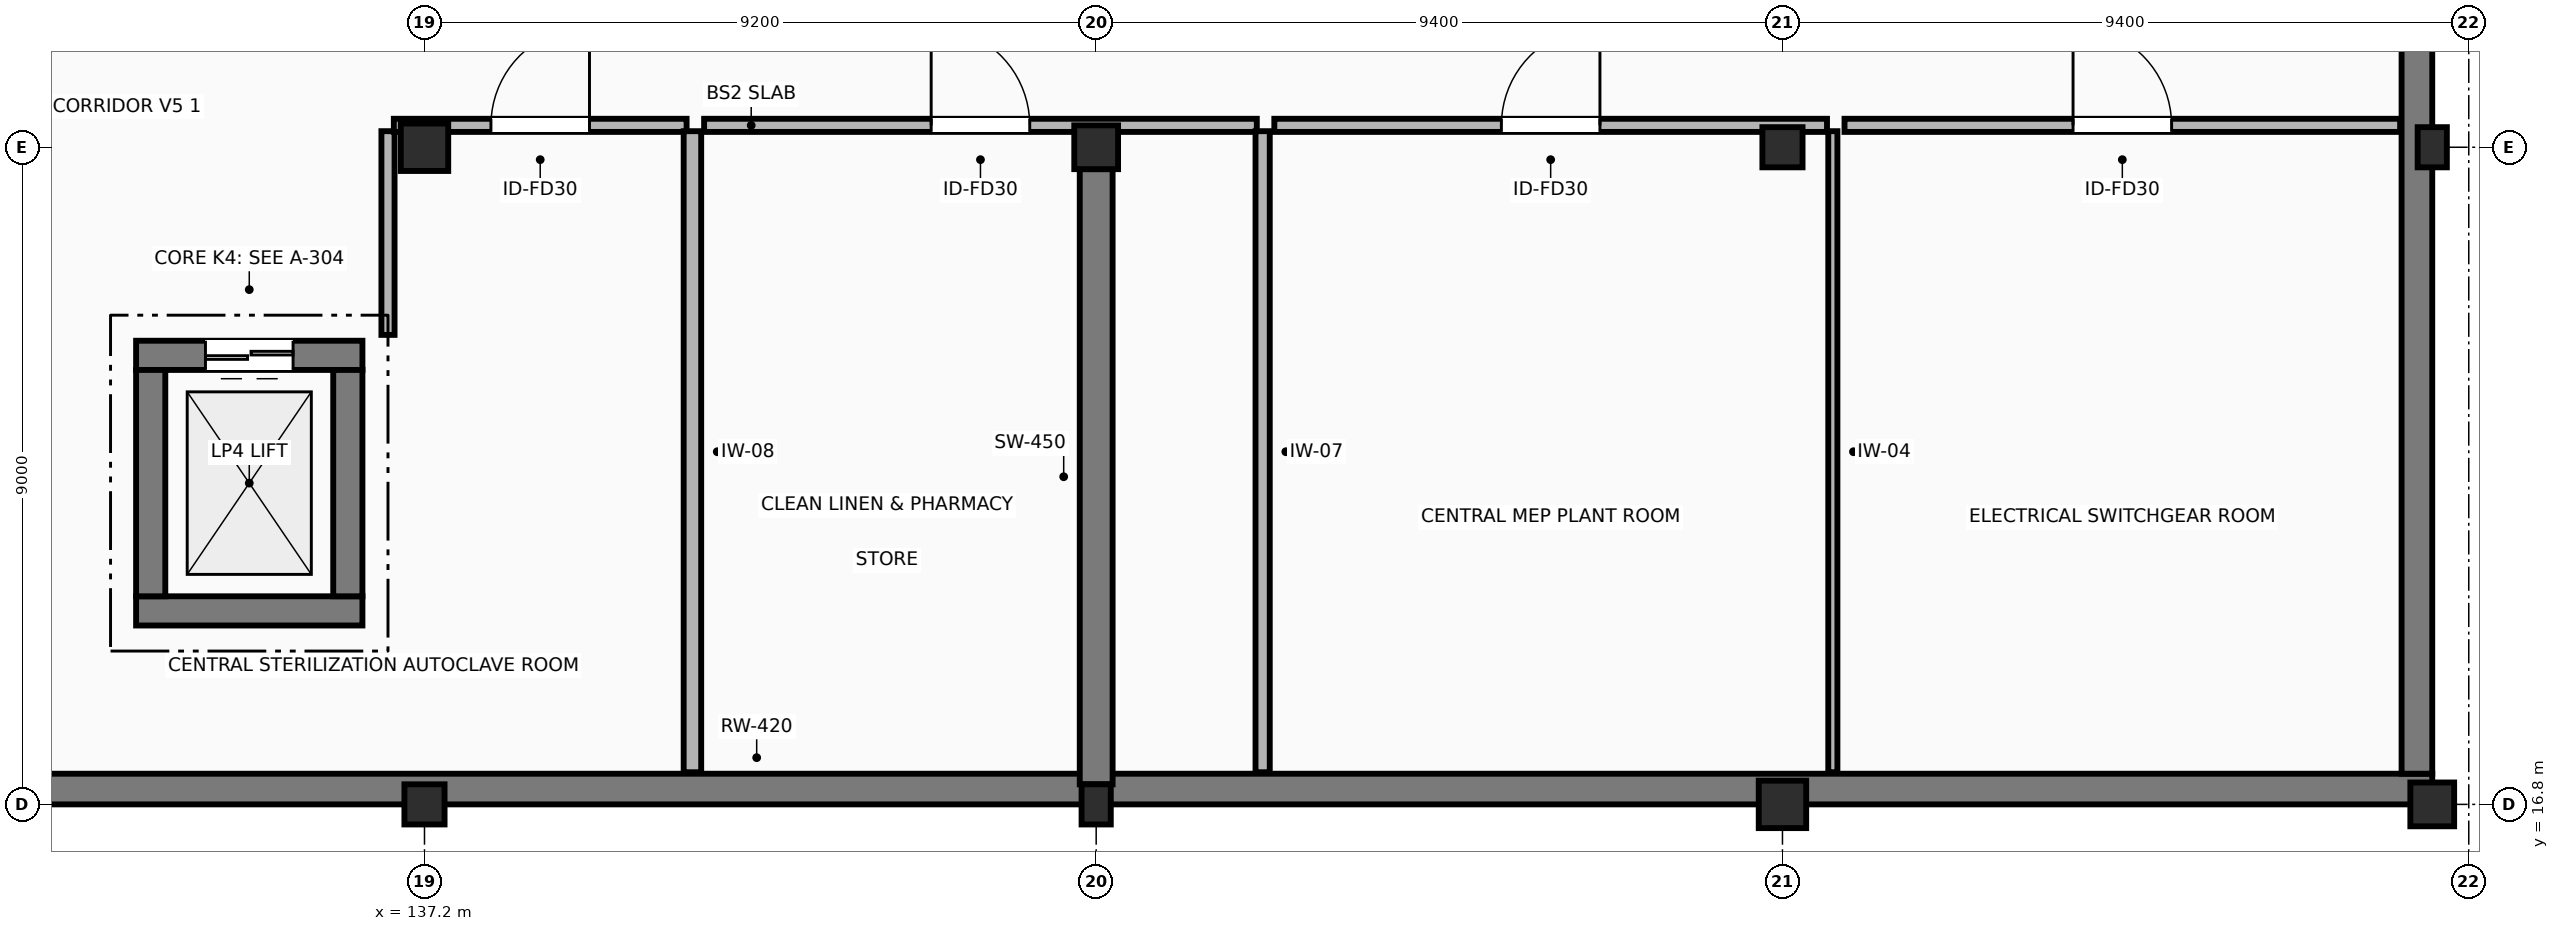
"""IFC4 building model, lengths in metres.
Left out: names, types, materials, properties, quantities, classifications, styles, units other than length and angle.
Written with IfcOpenShell. Run it as: python <this file> out.ifc"""

import sys

from ifc_helpers import new_model, si_unit, direction, frame, frame_2d, origin, origin_2d, place, context, subcontext, project, spatial, rectangle, extrude, element, fill, save


model = new_model("IFC4")
c1 = context("Model", 3, precision=1e-05, world=origin(), true_north=direction((0.0, 1.0)))
c2 = subcontext(c1, "Body", "Model", "MODEL_VIEW")
j1 = project(units=[si_unit("LENGTHUNIT", "METRE"), si_unit("PLANEANGLEUNIT", "RADIAN")], contexts=[c1])
p1 = place(None, origin())
s1 = spatial("IfcSite", under=j1, at=p1, CompositionType="ELEMENT")
p2 = place(p1, origin())
s2 = spatial("IfcBuilding", under=s1, at=p2, CompositionType="ELEMENT")
p3 = place(p2, frame((0.0, 0.0, -4.5)))
s3 = spatial("IfcBuildingStorey", under=s2, at=p3, CompositionType="ELEMENT", Elevation=-4.5)
p4 = place(p3, frame((137.2, 16.8, -0.55), z_axis=(0.0, 0.0, 1.0), x_axis=(1.0, 0.0, 0.0)))
e1 = element("IfcColumn", 1, at=p4, inside=s3, PredefinedType="COLUMN", context=c2, shape_type="SweptSolid", body=[
    extrude(rectangle(XDim=0.55, YDim=0.55, at=origin_2d()), origin(), (0.0, 0.0, 1.0), 5.05),
])
p5 = place(p3, frame((137.2, 25.8, -0.55), z_axis=(0.0, 0.0, 1.0), x_axis=(1.0, 0.0, 0.0)))
e2 = element("IfcColumn", 2, at=p5, inside=s3, PredefinedType="COLUMN", context=c2, shape_type="SweptSolid", body=[
    extrude(rectangle(XDim=0.65, YDim=0.65, at=origin_2d()), origin(), (0.0, 0.0, 1.0), 5.05),
])
p6 = place(p3, frame((146.4, 16.8, -0.55), z_axis=(0.0, 0.0, 1.0), x_axis=(1.0, 0.0, 0.0)))
e3 = element("IfcColumn", 3, at=p6, inside=s3, PredefinedType="COLUMN", context=c2, shape_type="SweptSolid", body=[
    extrude(rectangle(XDim=0.4, YDim=0.55, at=origin_2d()), origin(), (0.0, 0.0, 1.0), 5.05),
])
p7 = place(p3, frame((146.4, 25.8, -0.55), z_axis=(0.0, 0.0, 1.0), x_axis=(1.0, 0.0, 0.0)))
e4 = element("IfcColumn", 4, at=p7, inside=s3, PredefinedType="COLUMN", context=c2, shape_type="SweptSolid", body=[
    extrude(rectangle(XDim=0.6, YDim=0.6, at=origin_2d()), origin(), (0.0, 0.0, 1.0), 5.05),
])
p8 = place(p3, frame((155.8, 16.8, -0.55), z_axis=(0.0, 0.0, 1.0), x_axis=(1.0, 0.0, 0.0)))
e5 = element("IfcColumn", 5, at=p8, inside=s3, PredefinedType="COLUMN", context=c2, shape_type="SweptSolid", body=[
    extrude(rectangle(XDim=0.65, YDim=0.65, at=origin_2d()), origin(), (0.0, 0.0, 1.0), 5.05),
])
p9 = place(p3, frame((155.8, 25.8, -0.55), z_axis=(0.0, 0.0, 1.0), x_axis=(1.0, 0.0, 0.0)))
e6 = element("IfcColumn", 6, at=p9, inside=s3, PredefinedType="COLUMN", context=c2, shape_type="SweptSolid", body=[
    extrude(rectangle(XDim=0.55, YDim=0.55, at=origin_2d()), origin(), (0.0, 0.0, 1.0), 5.05),
])
p10 = place(p3, frame((164.7, 16.8, -0.55), z_axis=(0.0, 0.0, 1.0), x_axis=(1.0, 0.0, 0.0)))
e7 = element("IfcColumn", 7, at=p10, inside=s3, PredefinedType="COLUMN", context=c2, shape_type="SweptSolid", body=[
    extrude(rectangle(XDim=0.6, YDim=0.6, at=origin_2d()), origin(), (0.0, 0.0, 1.0), 5.05),
])
p11 = place(p3, frame((164.7, 25.8, -0.55), z_axis=(0.0, 0.0, 1.0), x_axis=(1.0, 0.0, 0.0)))
e8 = element("IfcColumn", 8, at=p11, inside=s3, PredefinedType="COLUMN", context=c2, shape_type="SweptSolid", body=[
    extrude(rectangle(XDim=0.4, YDim=0.55, at=origin_2d()), origin(), (0.0, 0.0, 1.0), 5.05),
])
p12 = place(p3, frame((118.8, 17.01, 0.0), z_axis=(0.0, 0.0, 1.0), x_axis=(1.0, 0.0, 0.0)))
e9 = element("IfcWall", 9, at=p12, inside=s3, PredefinedType="SHEAR", context=c2, shape_type="SweptSolid", body=[
    extrude(rectangle(XDim=45.9, YDim=0.42, at=frame_2d((22.95, 0.0))), origin(), (0.0, 0.0, 1.0), 4.2),
])
p13 = place(p3, frame((164.49, 43.98, 0.0), z_axis=(0.0, 0.0, 1.0), x_axis=(0.0, -1.0, 0.0)))
e10 = element("IfcWall", 10, at=p13, inside=s3, PredefinedType="SHEAR", context=c2, shape_type="SweptSolid", body=[
    extrude(rectangle(XDim=26.76, YDim=0.42, at=frame_2d((13.38, 0.0))), origin(), (0.0, 0.0, 1.0), 4.2),
])
p14 = place(p3, frame((133.25, 19.45, -0.55), z_axis=(0.0, 0.0, 1.0), x_axis=(1.0, 0.0, 0.0)))
e11 = element("IfcWall", 11, at=p14, inside=s3, PredefinedType="SHEAR", context=c2, shape_type="SweptSolid", body=[
    extrude(rectangle(XDim=3.1, YDim=0.4, at=frame_2d((1.55, 0.0))), origin(), (0.0, 0.0, 1.0), 5.05),
])
p15 = place(p3, frame((136.35, 22.95, -0.55), z_axis=(0.0, 0.0, 1.0), x_axis=(-1.0, 0.0, 0.0)))
e12 = element("IfcWall", 12, at=p15, inside=s3, PredefinedType="SHEAR", context=c2, shape_type="SweptSolid", body=[
    extrude(rectangle(XDim=3.1, YDim=0.4, at=frame_2d((1.55, 0.0))), origin(), (0.0, 0.0, 1.0), 5.05),
])
p16 = place(p15, frame((0.95, 0.0, 0.55)))
e13 = element("IfcOpeningElement", 13, at=p16, cuts=e12, PredefinedType="OPENING", context=c2, shape_type="SweptSolid", body=[
    extrude(rectangle(XDim=1.2, YDim=2.2, at=frame_2d((0.6, 1.1))), frame((0.0, 0.21, 0.0), z_axis=(0.0, -1.0, 0.0), x_axis=(1.0, 0.0, 0.0)), (0.0, 0.0, 1.0), 0.42),
])
for number, where, z_axis, x_axis in (
    (14, (133.45, 19.65, -0.55), (0.0, 0.0, 1.0), (0.0, 1.0, 0.0)),
    (15, (136.15, 22.75, -0.55), (0.0, 0.0, 1.0), (0.0, -1.0, 0.0)),
):
    element("IfcWall", number, at=place(p3, frame(where, z_axis=z_axis, x_axis=x_axis)), inside=s3, PredefinedType="SHEAR", context=c2, shape_type="SweptSolid", body=[
        extrude(rectangle(XDim=3.1, YDim=0.4, at=frame_2d((1.55, 0.0))), origin(), (0.0, 0.0, 1.0), 5.05),
    ])
p17 = place(p3, frame((146.4, 17.075, -0.55), z_axis=(0.0, 0.0, 1.0), x_axis=(0.0, 1.0, 0.0)))
e16 = element("IfcWall", 16, at=p17, inside=s3, PredefinedType="SHEAR", context=c2, shape_type="SweptSolid", body=[
    extrude(rectangle(XDim=8.425, YDim=0.45, at=frame_2d((4.212, 0.0))), origin(), (0.0, 0.0, 1.0), 4.75),
])
p18 = place(p3, frame((136.7, 23.23, 0.0), z_axis=(0.0, 0.0, 1.0), x_axis=(0.0, 1.0, 0.0)))
e17 = element("IfcWall", 17, at=p18, inside=s3, PredefinedType="PARTITIONING", context=c2, shape_type="SweptSolid", body=[
    extrude(rectangle(XDim=2.79, YDim=0.18, at=frame_2d((1.395, 0.0))), origin(), (0.0, 0.0, 1.0), 3.685),
])
p19 = place(p3, frame((136.78, 26.1, 0.0), z_axis=(0.0, 0.0, 1.0), x_axis=(1.0, 0.0, 0.0)))
e18 = element("IfcWall", 18, at=p19, inside=s3, PredefinedType="PARTITIONING", context=c2, shape_type="SweptSolid", body=[
    extrude(rectangle(XDim=4.01, YDim=0.18, at=frame_2d((2.005, 0.0))), origin(), (0.0, 0.0, 1.0), 3.535),
])
p20 = place(p19, frame((1.33, 0.0, 0.0)))
e19 = element("IfcOpeningElement", 19, at=p20, cuts=e18, PredefinedType="OPENING", context=c2, shape_type="SweptSolid", body=[
    extrude(rectangle(XDim=1.35, YDim=2.2, at=frame_2d((0.675, 1.1))), frame((0.0, 0.1, 0.0), z_axis=(0.0, -1.0, 0.0), x_axis=(1.0, 0.0, 0.0)), (0.0, 0.0, 1.0), 0.2),
])
p21 = place(p3, frame((140.87, 26.02, 0.0), z_axis=(0.0, 0.0, 1.0), x_axis=(0.0, -1.0, 0.0)))
e20 = element("IfcWall", 20, at=p21, inside=s3, PredefinedType="PARTITIONING", context=c2, shape_type="SweptSolid", body=[
    extrude(rectangle(XDim=8.78, YDim=0.24, at=frame_2d((4.39, 0.0))), origin(), (0.0, 0.0, 1.0), 4.2),
])
p22 = place(p3, frame((141.03, 26.1, 0.0), z_axis=(0.0, 0.0, 1.0), x_axis=(1.0, 0.0, 0.0)))
e21 = element("IfcWall", 21, at=p22, inside=s3, PredefinedType="PARTITIONING", context=c2, shape_type="SweptSolid", body=[
    extrude(rectangle(XDim=7.57, YDim=0.18, at=frame_2d((3.785, 0.0))), origin(), (0.0, 0.0, 1.0), 3.535),
])
p23 = place(p22, frame((3.11, 0.0, 0.0)))
e22 = element("IfcOpeningElement", 22, at=p23, cuts=e21, PredefinedType="OPENING", context=c2, shape_type="SweptSolid", body=[
    extrude(rectangle(XDim=1.35, YDim=2.2, at=frame_2d((0.675, 1.1))), frame((0.0, 0.1, 0.0), z_axis=(0.0, -1.0, 0.0), x_axis=(1.0, 0.0, 0.0)), (0.0, 0.0, 1.0), 0.2),
])
p24 = place(p3, frame((148.68, 26.02, 0.0), z_axis=(0.0, 0.0, 1.0), x_axis=(0.0, -1.0, 0.0)))
e23 = element("IfcWall", 23, at=p24, inside=s3, PredefinedType="PARTITIONING", context=c2, shape_type="SweptSolid", body=[
    extrude(rectangle(XDim=8.78, YDim=0.195, at=frame_2d((4.39, 0.0))), origin(), (0.0, 0.0, 1.0), 4.2),
])
p25 = place(p3, frame((148.84, 26.1, 0.0), z_axis=(0.0, 0.0, 1.0), x_axis=(1.0, 0.0, 0.0)))
e24 = element("IfcWall", 24, at=p25, inside=s3, PredefinedType="PARTITIONING", context=c2, shape_type="SweptSolid", body=[
    extrude(rectangle(XDim=7.57, YDim=0.18, at=frame_2d((3.785, 0.0))), origin(), (0.0, 0.0, 1.0), 3.535),
])
p26 = place(p25, frame((3.11, 0.0, 0.0)))
e25 = element("IfcOpeningElement", 25, at=p26, cuts=e24, PredefinedType="OPENING", context=c2, shape_type="SweptSolid", body=[
    extrude(rectangle(XDim=1.35, YDim=2.2, at=frame_2d((0.675, 1.1))), frame((0.0, 0.1, 0.0), z_axis=(0.0, -1.0, 0.0), x_axis=(1.0, 0.0, 0.0)), (0.0, 0.0, 1.0), 0.2),
])
p27 = place(p3, frame((156.49, 26.02, 0.0), z_axis=(0.0, 0.0, 1.0), x_axis=(0.0, -1.0, 0.0)))
e26 = element("IfcWall", 26, at=p27, inside=s3, PredefinedType="PARTITIONING", context=c2, shape_type="SweptSolid", body=[
    extrude(rectangle(XDim=8.78, YDim=0.125, at=frame_2d((4.39, 0.0))), origin(), (0.0, 0.0, 1.0), 4.2),
])
p28 = place(p3, frame((156.65, 26.1, 0.0), z_axis=(0.0, 0.0, 1.0), x_axis=(1.0, 0.0, 0.0)))
e27 = element("IfcWall", 27, at=p28, inside=s3, PredefinedType="PARTITIONING", context=c2, shape_type="SweptSolid", body=[
    extrude(rectangle(XDim=7.61, YDim=0.18, at=frame_2d((3.805, 0.0))), origin(), (0.0, 0.0, 1.0), 3.535),
])
p29 = place(p28, frame((3.13, 0.0, 0.0)))
e28 = element("IfcOpeningElement", 28, at=p29, cuts=e27, PredefinedType="OPENING", context=c2, shape_type="SweptSolid", body=[
    extrude(rectangle(XDim=1.35, YDim=2.2, at=frame_2d((0.675, 1.1))), frame((0.0, 0.1, 0.0), z_axis=(0.0, -1.0, 0.0), x_axis=(1.0, 0.0, 0.0)), (0.0, 0.0, 1.0), 0.2),
])
p30 = place(p16, origin())
e29 = element("IfcDoor", 29, at=p30, inside=s3, OperationType="DOUBLE_DOOR_SLIDING", PredefinedType="DOOR", context=c2, shape_type="SweptSolid", body=[
    extrude(rectangle(XDim=1.2, YDim=2.2, at=frame_2d((0.6, 1.1))), frame((0.0, 0.025, 0.0), z_axis=(0.0, -1.0, 0.0), x_axis=(1.0, 0.0, 0.0)), (0.0, 0.0, 1.0), 0.05),
])
fill(e13, e29)
p31 = place(p20, origin())
e30 = element("IfcDoor", 30, at=p31, inside=s3, OperationType="SINGLE_SWING_RIGHT", PredefinedType="DOOR", context=c2, shape_type="SweptSolid", body=[
    extrude(rectangle(XDim=1.35, YDim=2.2, at=frame_2d((0.675, 1.1))), frame((0.0, 0.025, 0.0), z_axis=(0.0, -1.0, 0.0), x_axis=(1.0, 0.0, 0.0)), (0.0, 0.0, 1.0), 0.05),
])
fill(e19, e30)
p32 = place(p23, origin())
e31 = element("IfcDoor", 31, at=p32, inside=s3, OperationType="SINGLE_SWING_LEFT", PredefinedType="DOOR", context=c2, shape_type="SweptSolid", body=[
    extrude(rectangle(XDim=1.35, YDim=2.2, at=frame_2d((0.675, 1.1))), frame((0.0, 0.025, 0.0), z_axis=(0.0, -1.0, 0.0), x_axis=(1.0, 0.0, 0.0)), (0.0, 0.0, 1.0), 0.05),
])
fill(e22, e31)
p33 = place(p26, origin())
e32 = element("IfcDoor", 32, at=p33, inside=s3, OperationType="SINGLE_SWING_RIGHT", PredefinedType="DOOR", context=c2, shape_type="SweptSolid", body=[
    extrude(rectangle(XDim=1.35, YDim=2.2, at=frame_2d((0.675, 1.1))), frame((0.0, 0.025, 0.0), z_axis=(0.0, -1.0, 0.0), x_axis=(1.0, 0.0, 0.0)), (0.0, 0.0, 1.0), 0.05),
])
fill(e25, e32)
p34 = place(p29, origin())
e33 = element("IfcDoor", 33, at=p34, inside=s3, OperationType="SINGLE_SWING_LEFT", PredefinedType="DOOR", context=c2, shape_type="SweptSolid", body=[
    extrude(rectangle(XDim=1.35, YDim=2.2, at=frame_2d((0.675, 1.1))), frame((0.0, 0.025, 0.0), z_axis=(0.0, -1.0, 0.0), x_axis=(1.0, 0.0, 0.0)), (0.0, 0.0, 1.0), 0.05),
])
fill(e28, e33)
save(model, sys.argv[1])
